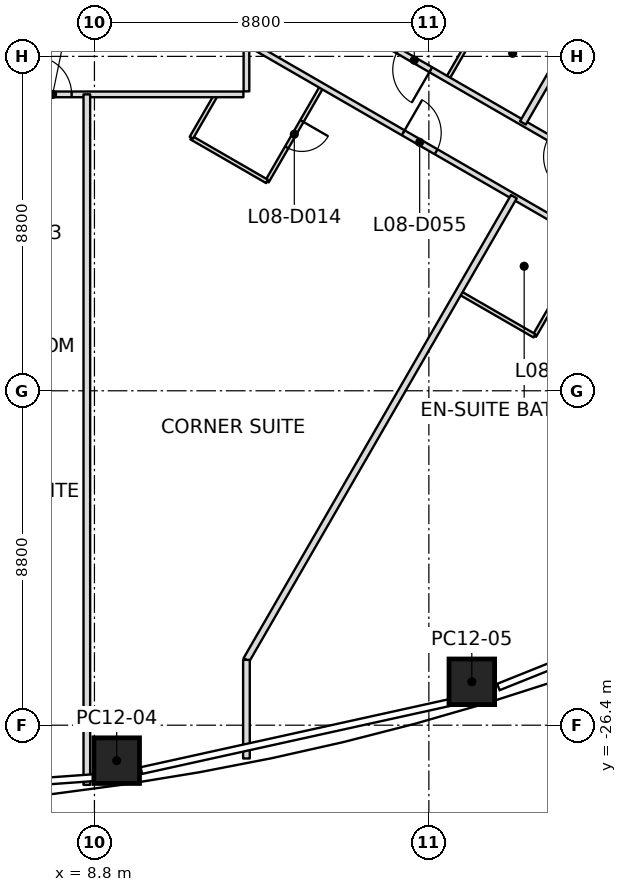
"""IFC4 building model, lengths in metres.
Left out: names, types, materials, properties, quantities, classifications, styles, units other than length and angle.
Written with IfcOpenShell. Run it as: python <this file> out.ifc"""

import sys

from ifc_helpers import new_model, si_unit, direction, frame, frame_2d, origin, origin_2d, place, context, subcontext, project, spatial, rectangle, extrude, clip, halfspace, element, fill, save


model = new_model("IFC4")
c1 = context("Model", 3, precision=1e-05, world=origin(), true_north=direction((0.0, 1.0)))
c2 = subcontext(c1, "Body", "Model", "MODEL_VIEW")
j1 = project(units=[si_unit("LENGTHUNIT", "METRE"), si_unit("PLANEANGLEUNIT", "RADIAN")], contexts=[c1])
p1 = place(None, origin())
s1 = spatial("IfcSite", under=j1, at=p1, CompositionType="ELEMENT")
p2 = place(p1, origin())
s2 = spatial("IfcBuilding", under=s1, at=p2, CompositionType="ELEMENT")
p3 = place(p2, frame((0.0, 0.0, 51.7)))
s3 = spatial("IfcBuildingStorey", under=s2, at=p3, CompositionType="ELEMENT", Elevation=51.7)
p4 = place(p3, frame((9.385, -27.333, 0.0), z_axis=(-0.009452762663, 0.224036905553, 0.974534817351), x_axis=(-0.982720582571, -0.182243855241, 0.032364082218)))
e1 = element("IfcColumn", 1, at=p4, inside=s3, PredefinedType="COLUMN", context=c2, shape_type="SweptSolid", body=[
    extrude(rectangle(XDim=1.2, YDim=1.2, at=origin_2d()), origin(), (0.0, 0.0, 1.0), 3.797),
])
p5 = place(p3, frame((18.73, -25.258, 0.0), z_axis=(-0.018960260892, 0.176875858454, 0.984050526753), x_axis=(0.957447491583, 0.286704825548, -0.033085402656)))
e2 = element("IfcColumn", 2, at=p5, inside=s3, PredefinedType="COLUMN", context=c2, shape_type="SweptSolid", body=[
    clip(clip(extrude(rectangle(XDim=1.2, YDim=1.2, at=origin_2d()), origin(), (0.0, 0.0, 1.0), 3.76), halfspace(frame((0.0, 0.0, 0.001)), True)), halfspace(frame((0.0, 0.0, 3.759)), False)),
])
p6 = place(p3, frame((8.6, -9.8, 0.0), z_axis=(0.0, 0.0, 1.0), x_axis=(0.0, -1.0, 0.0)))
e3 = element("IfcWall", 3, at=p6, inside=s3, PredefinedType="PARTITIONING", context=c2, shape_type="SweptSolid", body=[
    extrude(rectangle(XDim=18.17, YDim=0.175, at=frame_2d((9.085, 0.0))), origin(), (0.0, 0.0, 1.0), 2.934),
])
p7 = place(p3, frame((19.837, -12.492, 0.0), z_axis=(0.0, 0.0, 1.0), x_axis=(-0.499999252047, -0.866025835615, 0.0)))
e4 = element("IfcWall", 4, at=p7, inside=s3, PredefinedType="PARTITIONING", context=c2, shape_type="SweptSolid", body=[
    extrude(rectangle(XDim=14.074, YDim=0.175, at=frame_2d((7.037, 0.0))), origin(), (0.0, 0.0, 1.0), 2.797),
])
p8 = place(p3, frame((12.8, -24.68, 0.0), z_axis=(0.0, 0.0, 1.0), x_axis=(0.0, -1.0, 0.0)))
e5 = element("IfcWall", 5, at=p8, inside=s3, PredefinedType="PARTITIONING", context=c2, shape_type="SweptSolid", body=[
    extrude(rectangle(XDim=2.595, YDim=0.175, at=frame_2d((1.298, 0.0))), origin(), (0.0, 0.0, 1.0), 2.934),
])
p9 = place(p3, frame((20.075, -10.551, 0.0), z_axis=(0.0, 0.0, 1.0), x_axis=(0.500002172007, 0.866024149772, 0.0)))
e6 = element("IfcWall", 6, at=p9, inside=s3, PredefinedType="PARTITIONING", context=c2, shape_type="SweptSolid", body=[
    extrude(rectangle(XDim=12.214, YDim=0.175, at=frame_2d((6.107, 0.0))), origin(), (0.0, 0.0, 1.0), 2.934),
])
p10 = place(p3, frame((-12.72, -9.8, 0.0), z_axis=(0.0, 0.0, 1.0), x_axis=(1.0, 0.0, 0.0)))
e7 = element("IfcWall", 7, at=p10, inside=s3, PredefinedType="PARTITIONING", context=c2, shape_type="SweptSolid", body=[
    extrude(rectangle(XDim=25.44, YDim=0.15, at=frame_2d((12.72, 0.0))), origin(), (0.0, 0.0, 1.0), 2.947),
])
p11 = place(p10, frame((7.32, 0.0, 0.0)))
e8 = element("IfcOpeningElement", 8, at=p11, cuts=e7, PredefinedType="OPENING", context=c2, shape_type="SweptSolid", body=[
    extrude(rectangle(XDim=1.0, YDim=2.1, at=frame_2d((0.5, 1.05))), frame((0.0, 0.075, 0.0), z_axis=(0.0, -1.0, 0.0), x_axis=(1.0, 0.0, 0.0)), (0.0, 0.0, 1.0), 0.15),
])
p12 = place(p10, frame((11.52, 0.0, 0.0)))
e9 = element("IfcOpeningElement", 9, at=p12, cuts=e7, PredefinedType="OPENING", context=c2, shape_type="SweptSolid", body=[
    extrude(rectangle(XDim=1.0, YDim=2.1, at=frame_2d((0.5, 1.05))), frame((0.0, 0.075, 0.0), z_axis=(0.0, -1.0, 0.0), x_axis=(1.0, 0.0, 0.0)), (0.0, 0.0, 1.0), 0.15),
])
p13 = place(p10, frame((15.72, 0.0, 0.0)))
e10 = element("IfcOpeningElement", 10, at=p13, cuts=e7, PredefinedType="OPENING", context=c2, shape_type="SweptSolid", body=[
    extrude(rectangle(XDim=1.0, YDim=2.1, at=frame_2d((0.5, 1.05))), frame((0.0, 0.075, 0.0), z_axis=(0.0, -1.0, 0.0), x_axis=(1.0, 0.0, 0.0)), (0.0, 0.0, 1.0), 0.15),
])
p14 = place(p10, frame((19.92, 0.0, 0.0)))
e11 = element("IfcOpeningElement", 11, at=p14, cuts=e7, PredefinedType="OPENING", context=c2, shape_type="SweptSolid", body=[
    extrude(rectangle(XDim=1.0, YDim=2.1, at=frame_2d((0.5, 1.05))), frame((0.0, 0.075, 0.0), z_axis=(0.0, -1.0, 0.0), x_axis=(1.0, 0.0, 0.0)), (0.0, 0.0, 1.0), 0.15),
])
p15 = place(p3, frame((12.8, -9.72, 0.0), z_axis=(0.0, 0.0, 1.0), x_axis=(0.0, 1.0, 0.0)))
e12 = element("IfcWall", 12, at=p15, inside=s3, PredefinedType="PARTITIONING", context=c2, shape_type="SweptSolid", body=[
    extrude(rectangle(XDim=1.291, YDim=0.15, at=frame_2d((0.646, 0.0))), origin(), (0.0, 0.0, 1.0), 2.797),
])
p16 = place(p3, frame((12.879, -8.475, 0.0), z_axis=(0.0, 0.0, 1.0), x_axis=(0.866022744679, -0.500004605677, 0.0)))
e13 = element("IfcWall", 13, at=p16, inside=s3, PredefinedType="PARTITIONING", context=c2, shape_type="SweptSolid", body=[
    extrude(rectangle(XDim=12.234, YDim=0.15, at=frame_2d((6.117, 0.0))), origin(), (0.0, 0.0, 1.0), 2.797),
])
p17 = place(p16, frame((4.671, 0.0, 0.0)))
e14 = element("IfcOpeningElement", 14, at=p17, cuts=e13, PredefinedType="OPENING", context=c2, shape_type="SweptSolid", body=[
    extrude(rectangle(XDim=1.0, YDim=2.1, at=frame_2d((0.5, 1.05))), frame((0.0, 0.075, 0.0), z_axis=(0.0, -1.0, 0.0), x_axis=(1.0, 0.0, 0.0)), (0.0, 0.0, 1.0), 0.15),
])
p18 = place(p16, frame((10.834, 0.0, 0.0)))
e15 = element("IfcOpeningElement", 15, at=p18, cuts=e13, PredefinedType="OPENING", context=c2, shape_type="SweptSolid", body=[
    extrude(rectangle(XDim=1.0, YDim=2.1, at=frame_2d((0.5, 1.05))), frame((0.0, 0.075, 0.0), z_axis=(0.0, -1.0, 0.0), x_axis=(1.0, 0.0, 0.0)), (0.0, 0.0, 1.0), 0.15),
])
p19 = place(p3, frame((24.305, -12.993, 0.0), z_axis=(0.0, 0.0, 1.0), x_axis=(-0.86602583418, 0.499999254532, 0.0)))
e16 = element("IfcWall", 16, at=p19, inside=s3, PredefinedType="PARTITIONING", context=c2, shape_type="SweptSolid", body=[
    extrude(rectangle(XDim=13.285, YDim=0.15, at=frame_2d((6.642, 0.0))), origin(), (0.0, 0.0, 1.0), 2.947),
])
p20 = place(p19, frame((3.102, 0.0, 0.0)))
e17 = element("IfcOpeningElement", 17, at=p20, cuts=e16, PredefinedType="OPENING", context=c2, shape_type="SweptSolid", body=[
    extrude(rectangle(XDim=1.0, YDim=2.1, at=frame_2d((0.5, 1.05))), frame((0.0, 0.075, 0.0), z_axis=(0.0, -1.0, 0.0), x_axis=(1.0, 0.0, 0.0)), (0.0, 0.0, 1.0), 0.15),
])
p21 = place(p19, frame((7.685, 0.0, 0.0)))
e18 = element("IfcOpeningElement", 18, at=p21, cuts=e16, PredefinedType="OPENING", context=c2, shape_type="SweptSolid", body=[
    extrude(rectangle(XDim=1.0, YDim=2.1, at=frame_2d((0.5, 1.05))), frame((0.0, 0.075, 0.0), z_axis=(0.0, -1.0, 0.0), x_axis=(1.0, 0.0, 0.0)), (0.0, 0.0, 1.0), 0.15),
])
p22 = place(p3, frame((14.777, -9.605, 0.0), z_axis=(0.0, 0.0, 1.0), x_axis=(-0.499999802827, -0.866025517622, 0.0)))
e19 = element("IfcWall", 19, at=p22, inside=s3, PredefinedType="PARTITIONING", context=c2, shape_type="SweptSolid", body=[
    extrude(rectangle(XDim=2.87, YDim=0.1, at=frame_2d((1.435, 0.0))), origin(), (0.0, 0.0, 1.0), 2.797),
])
p23 = place(p22, frame((1.035, 0.0, 0.0)))
e20 = element("IfcOpeningElement", 20, at=p23, cuts=e19, PredefinedType="OPENING", context=c2, shape_type="SweptSolid", body=[
    extrude(rectangle(XDim=0.8, YDim=2.1, at=frame_2d((0.4, 1.05))), frame((0.0, 0.05, 0.0), z_axis=(0.0, -1.0, 0.0), x_axis=(1.0, 0.0, 0.0)), (0.0, 0.0, 1.0), 0.1),
])
p24 = place(p3, frame((13.342, -12.091, 0.0), z_axis=(0.0, 0.0, 1.0), x_axis=(-0.86602648383, 0.499998129301, 0.0)))
e21 = element("IfcWall", 21, at=p24, inside=s3, PredefinedType="PARTITIONING", context=c2, shape_type="SweptSolid", body=[
    extrude(rectangle(XDim=2.3, YDim=0.1, at=frame_2d((1.15, 0.0))), origin(), (0.0, 0.0, 1.0), 2.947),
])
p25 = place(p3, frame((11.35, -10.941, 0.0), z_axis=(0.0, 0.0, 1.0), x_axis=(0.499865263774, 0.866103179807, 0.0)))
e22 = element("IfcWall", 22, at=p25, inside=s3, PredefinedType="PARTITIONING", context=c2, shape_type="SweptSolid", body=[
    extrude(rectangle(XDim=1.282, YDim=0.1, at=frame_2d((0.641, 0.0))), origin(), (0.0, 0.0, 1.0), 3.15),
])
p26 = place(p3, frame((18.098, -9.375, 0.0), z_axis=(0.0, 0.0, 1.0), x_axis=(0.499936001555, 0.866062350151, 0.0)))
e23 = element("IfcWall", 23, at=p26, inside=s3, PredefinedType="PARTITIONING", context=c2, shape_type="SweptSolid", body=[
    extrude(rectangle(XDim=2.87, YDim=0.1, at=frame_2d((1.435, 0.0))), origin(), (0.0, 0.0, 1.0), 2.947),
])
p27 = place(p26, frame((1.035, 0.0, 0.0)))
e24 = element("IfcOpeningElement", 24, at=p27, cuts=e23, PredefinedType="OPENING", context=c2, shape_type="SweptSolid", body=[
    extrude(rectangle(XDim=0.8, YDim=2.1, at=frame_2d((0.4, 1.05))), frame((0.0, 0.05, 0.0), z_axis=(0.0, -1.0, 0.0), x_axis=(1.0, 0.0, 0.0)), (0.0, 0.0, 1.0), 0.1),
])
p28 = place(p3, frame((21.814, -13.668, 0.0), z_axis=(0.0, 0.0, 1.0), x_axis=(-0.499972835562, -0.866041086612, 0.0)))
e25 = element("IfcWall", 25, at=p28, inside=s3, PredefinedType="PARTITIONING", context=c2, shape_type="SweptSolid", body=[
    extrude(rectangle(XDim=2.87, YDim=0.1, at=frame_2d((1.435, 0.0))), origin(), (0.0, 0.0, 1.0), 3.15),
])
p29 = place(p28, frame((1.035, 0.0, 0.0)))
e26 = element("IfcOpeningElement", 26, at=p29, cuts=e25, PredefinedType="OPENING", context=c2, shape_type="SweptSolid", body=[
    extrude(rectangle(XDim=0.8, YDim=2.1, at=frame_2d((0.4, 1.05))), frame((0.0, 0.05, 0.0), z_axis=(0.0, -1.0, 0.0), x_axis=(1.0, 0.0, 0.0)), (0.0, 0.0, 1.0), 0.1),
])
p30 = place(p3, frame((20.379, -16.154, 0.0), z_axis=(0.0, 0.0, 1.0), x_axis=(-0.866044110172, 0.499967598186, 0.0)))
e27 = element("IfcWall", 27, at=p30, inside=s3, PredefinedType="PARTITIONING", context=c2, shape_type="SweptSolid", body=[
    extrude(rectangle(XDim=2.27, YDim=0.1, at=frame_2d((1.135, 0.0))), origin(), (0.0, 0.0, 1.0), 3.15),
])
p31 = place(p14, origin())
e28 = element("IfcDoor", 28, at=p31, inside=s3, OperationType="SINGLE_SWING_LEFT", PredefinedType="DOOR", context=c2, shape_type="SweptSolid", body=[
    extrude(rectangle(XDim=1.0, YDim=2.1, at=frame_2d((0.5, 1.05))), frame((0.0, 0.025, 0.0), z_axis=(0.0, -1.0, 0.0), x_axis=(1.0, 0.0, 0.0)), (0.0, 0.0, 1.0), 0.05),
])
fill(e11, e28)
p32 = place(p17, origin())
e29 = element("IfcDoor", 29, at=p32, inside=s3, OperationType="SINGLE_SWING_LEFT", PredefinedType="DOOR", context=c2, shape_type="SweptSolid", body=[
    extrude(rectangle(XDim=1.0, YDim=2.1, at=frame_2d((0.5, 1.05))), frame((0.0, 0.025, 0.0), z_axis=(0.0, -1.0, 0.0), x_axis=(1.0, 0.0, 0.0)), (0.0, 0.0, 1.0), 0.05),
])
fill(e14, e29)
p33 = place(p23, origin())
e30 = element("IfcDoor", 30, at=p33, inside=s3, OperationType="SINGLE_SWING_RIGHT", PredefinedType="DOOR", context=c2, shape_type="SweptSolid", body=[
    extrude(rectangle(XDim=0.8, YDim=2.1, at=frame_2d((0.4, 1.05))), frame((0.0, 0.025, 0.0), z_axis=(0.0, -1.0, 0.0), x_axis=(1.0, 0.0, 0.0)), (0.0, 0.0, 1.0), 0.05),
])
fill(e20, e30)
p34 = place(p21, origin())
e31 = element("IfcDoor", 31, at=p34, inside=s3, OperationType="SINGLE_SWING_LEFT", PredefinedType="DOOR", context=c2, shape_type="SweptSolid", body=[
    extrude(rectangle(XDim=1.0, YDim=2.1, at=frame_2d((0.5, 1.05))), frame((0.0, 0.025, 0.0), z_axis=(0.0, -1.0, 0.0), x_axis=(1.0, 0.0, 0.0)), (0.0, 0.0, 1.0), 0.05),
])
fill(e18, e31)
save(model, sys.argv[1])
